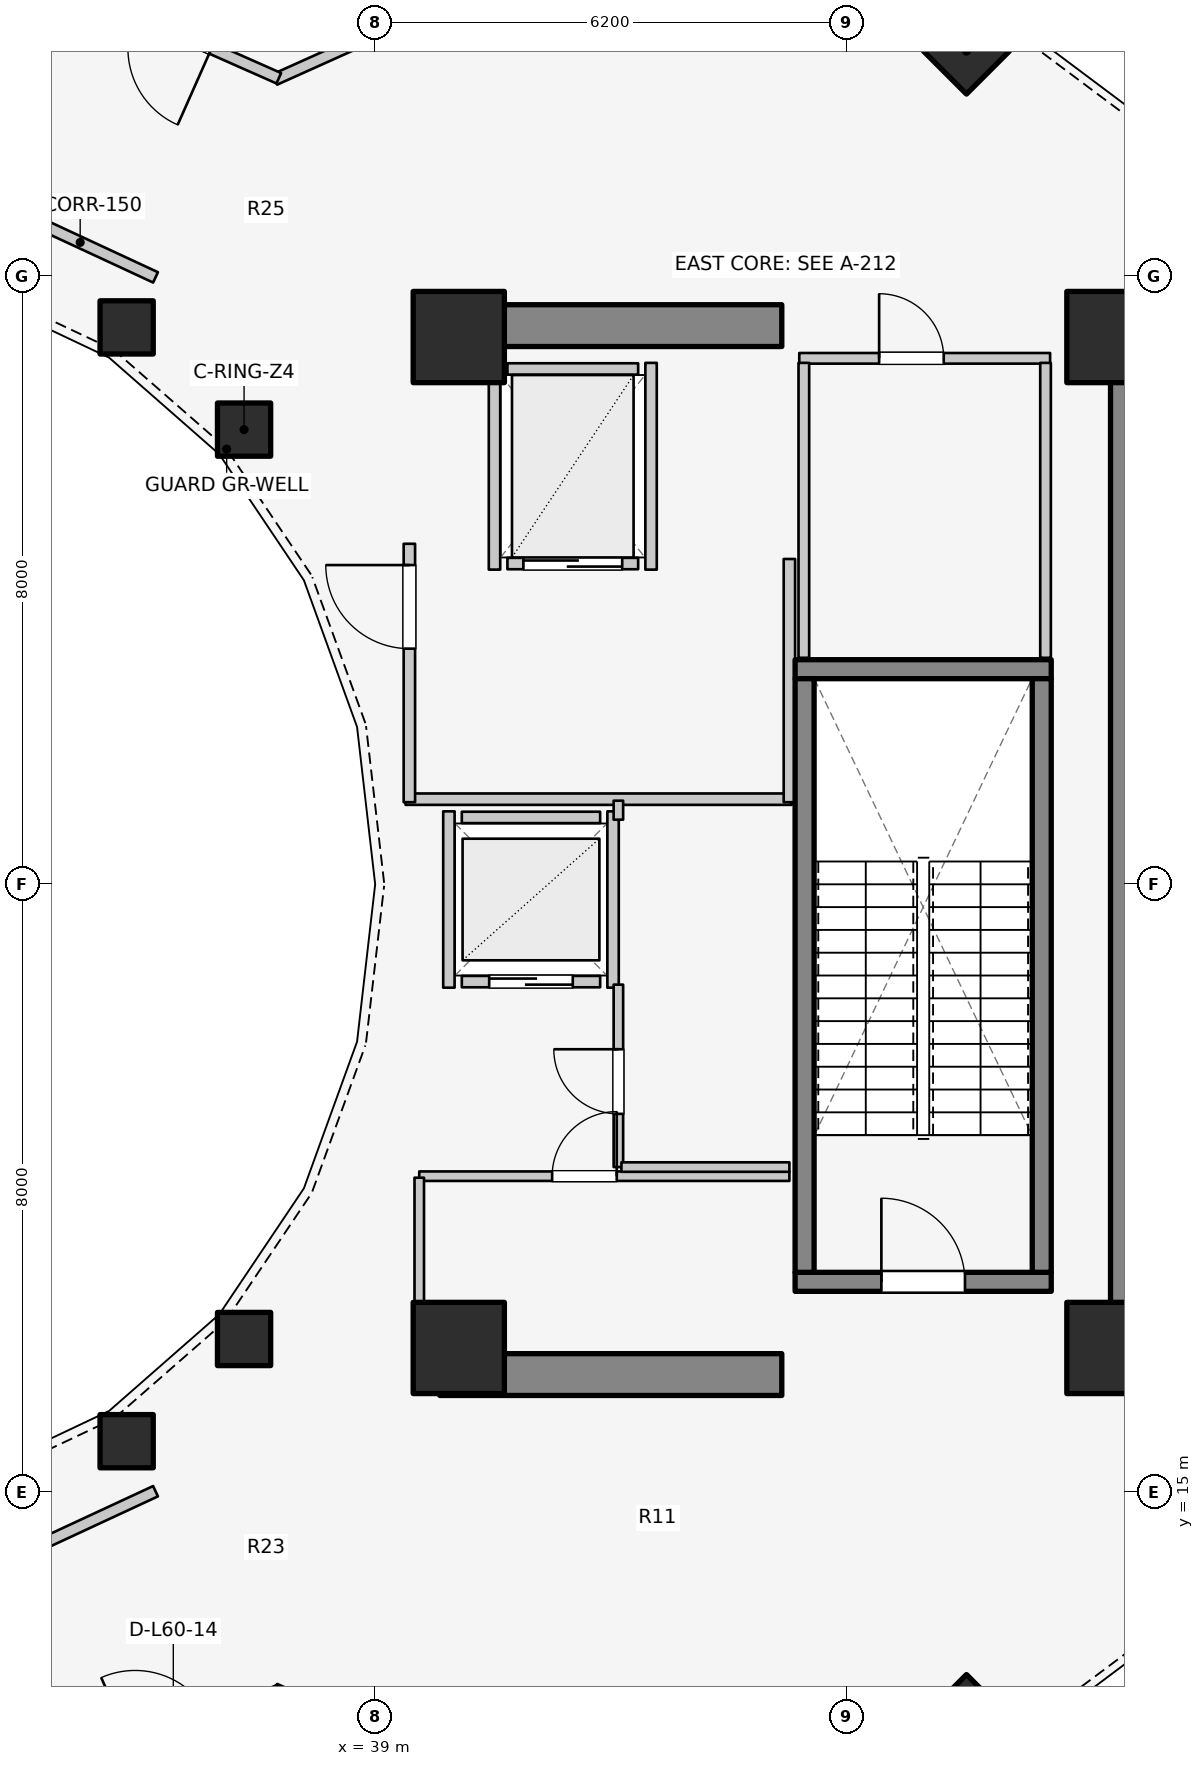
"""IFC4 building model, lengths in metres.
Left out: names, types, materials, properties, quantities, classifications, styles, units other than length and angle.
Written with IfcOpenShell. Run it as: python <this file> out.ifc"""

import sys

from ifc_helpers import new_model, si_unit, direction, frame, frame_2d, origin, origin_2d, place, context, subcontext, project, spatial, rectangle, extrude, element, fill, save


model = new_model("IFC4")
c1 = context("Model", 3, precision=1e-05, world=origin(), true_north=direction((0.0, 1.0)))
c2 = subcontext(c1, "Body", "Model", "MODEL_VIEW")
j1 = project(units=[si_unit("LENGTHUNIT", "METRE"), si_unit("PLANEANGLEUNIT", "RADIAN")], contexts=[c1])
p1 = place(None, origin())
s1 = spatial("IfcSite", under=j1, at=p1, CompositionType="ELEMENT")
p2 = place(p1, origin())
s2 = spatial("IfcBuilding", under=s1, at=p2, CompositionType="ELEMENT")
p3 = place(p2, frame((0.0, 0.0, 197.4)))
s3 = spatial("IfcBuildingStorey", under=s2, at=p3, CompositionType="ELEMENT", Elevation=197.4)
p4 = place(p3, frame((48.95, 17.05, 0.0), z_axis=(0.0, 0.0, 1.0), x_axis=(0.0, 1.0, 0.0)))
e1 = element("IfcWall", 1, at=p4, inside=s3, PredefinedType="SHEAR", context=c2, shape_type="SweptSolid", body=[
    extrude(rectangle(XDim=12.8, YDim=0.55, at=frame_2d((6.4, 0.0))), origin(), (0.0, 0.0, 1.0), 4.2),
])
for number, where, z_axis, x_axis in (
    (2, (39.85, 16.55, 0.0), (0.0, 0.0, 1.0), (1.0, 0.0, 0.0)),
    (3, (39.85, 30.35, 0.0), (0.0, 0.0, 1.0), (1.0, 0.0, 0.0)),
):
    element("IfcWall", number, at=place(p3, frame(where, z_axis=z_axis, x_axis=x_axis)), inside=s3, PredefinedType="SHEAR", context=c2, shape_type="SweptSolid", body=[
        extrude(rectangle(XDim=4.5, YDim=0.55, at=frame_2d((2.25, 0.0))), origin(), (0.0, 0.0, 1.0), 4.2),
    ])
p5 = place(p3, frame((44.525, 17.77, 0.0), z_axis=(0.0, 0.0, 1.0), x_axis=(1.0, 0.0, 0.0)))
e4 = element("IfcWall", 4, at=p5, inside=s3, PredefinedType="SOLIDWALL", context=c2, shape_type="SweptSolid", body=[
    extrude(rectangle(XDim=3.37, YDim=0.25, at=frame_2d((1.685, 0.0))), origin(), (0.0, 0.0, 1.0), 4.2),
])
p6 = place(p5, frame((1.135, 0.0, 0.0)))
e5 = element("IfcOpeningElement", 5, at=p6, cuts=e4, PredefinedType="OPENING", context=c2, shape_type="SweptSolid", body=[
    extrude(rectangle(XDim=1.1, YDim=2.1, at=frame_2d((0.55, 1.05))), frame((0.0, 0.135, 0.0), z_axis=(0.0, -1.0, 0.0), x_axis=(1.0, 0.0, 0.0)), (0.0, 0.0, 1.0), 0.27),
])
p7 = place(p3, frame((44.525, 25.83, 0.0), z_axis=(0.0, 0.0, 1.0), x_axis=(1.0, 0.0, 0.0)))
e6 = element("IfcWall", 6, at=p7, inside=s3, PredefinedType="SOLIDWALL", context=c2, shape_type="SweptSolid", body=[
    extrude(rectangle(XDim=3.37, YDim=0.25, at=frame_2d((1.685, 0.0))), origin(), (0.0, 0.0, 1.0), 4.2),
])
for number, where, z_axis, x_axis in (
    (7, (44.65, 17.895, 0.0), (0.0, 0.0, 1.0), (0.0, 1.0, 0.0)),
    (8, (47.77, 17.895, 0.0), (0.0, 0.0, 1.0), (0.0, 1.0, 0.0)),
):
    element("IfcWall", number, at=place(p3, frame(where, z_axis=z_axis, x_axis=x_axis)), inside=s3, PredefinedType="SOLIDWALL", context=c2, shape_type="SweptSolid", body=[
        extrude(rectangle(XDim=7.81, YDim=0.25, at=frame_2d((3.905, 0.0))), origin(), (0.0, 0.0, 1.0), 4.2),
    ])
for number, where, z_axis, x_axis in (
    (9, (40.1, 16.9, 0.0), (0.0, 0.0, 1.0), (1.0, 0.0, 0.0)),
    (10, (48.7, 16.9, 0.0), (0.0, 0.0, 1.0), (1.0, 0.0, 0.0)),
    (11, (48.7, 30.2, 0.0), (0.0, 0.0, 1.0), (1.0, 0.0, 0.0)),
    (12, (40.1, 30.2, 0.0), (0.0, 0.0, 1.0), (1.0, 0.0, 0.0)),
):
    element("IfcColumn", number, at=place(p3, frame(where, z_axis=z_axis, x_axis=x_axis)), inside=s3, PredefinedType="COLUMN", context=c2, shape_type="SweptSolid", body=[
        extrude(rectangle(XDim=1.2, YDim=1.2, at=origin_2d()), origin(), (0.0, 0.0, 1.0), 4.2),
    ])
p8 = place(p3, frame((37.275, 28.982, 0.0), z_axis=(0.0, 0.0, 1.0), x_axis=(1.0, 0.0, 0.0)))
e13 = element("IfcColumn", 13, at=p8, inside=s3, PredefinedType="COLUMN", context=c2, shape_type="SweptSolid", body=[
    extrude(rectangle(XDim=0.7, YDim=0.7, at=origin_2d()), origin(), (0.0, 0.0, 1.0), 4.2),
])
p9 = place(p3, frame((46.78, 33.962, 0.0), z_axis=(0.0, 0.0, 1.0), x_axis=(0.707106781187, 0.707106781187, 0.0)))
e14 = element("IfcColumn", 14, at=p9, inside=s3, PredefinedType="COLUMN", context=c2, shape_type="SweptSolid", body=[
    extrude(rectangle(XDim=0.8, YDim=0.8, at=origin_2d()), origin(), (0.0, 0.0, 1.0), 4.2),
])
for number, where, z_axis, x_axis in (
    (15, (35.73, 30.327, 0.0), (0.0, 0.0, 1.0), (1.0, 0.0, 0.0)),
    (16, (35.73, 15.673, 0.0), (0.0, 0.0, 1.0), (1.0, 0.0, 0.0)),
    (17, (37.275, 17.018, 0.0), (0.0, 0.0, 1.0), (1.0, 0.0, 0.0)),
):
    element("IfcColumn", number, at=place(p3, frame(where, z_axis=z_axis, x_axis=x_axis)), inside=s3, PredefinedType="COLUMN", context=c2, shape_type="SweptSolid", body=[
        extrude(rectangle(XDim=0.7, YDim=0.7, at=origin_2d()), origin(), (0.0, 0.0, 1.0), 4.2),
    ])
p10 = place(p3, frame((46.78, 12.038, 0.0), z_axis=(0.0, 0.0, 1.0), x_axis=(0.707106781187, -0.707106781187, 0.0)))
e18 = element("IfcColumn", 18, at=p10, inside=s3, PredefinedType="COLUMN", context=c2, shape_type="SweptSolid", body=[
    extrude(rectangle(XDim=0.8, YDim=0.8, at=origin_2d()), origin(), (0.0, 0.0, 1.0), 4.2),
])
p11 = place(p3, frame((40.14, 21.72, 0.0), z_axis=(0.0, 0.0, 1.0), x_axis=(1.0, 0.0, 0.0)))
e19 = element("IfcWall", 19, at=p11, inside=s3, PredefinedType="SOLIDWALL", context=c2, shape_type="SweptSolid", body=[
    extrude(rectangle(XDim=1.82, YDim=0.15, at=frame_2d((0.91, 0.0))), origin(), (0.0, 0.0, 1.0), 3.22),
])
p12 = place(p11, frame((0.36, 0.0, 0.0)))
e20 = element("IfcOpeningElement", 20, at=p12, cuts=e19, PredefinedType="OPENING", context=c2, shape_type="SweptSolid", body=[
    extrude(rectangle(XDim=1.1, YDim=2.1, at=frame_2d((0.55, 1.05))), frame((0.0, 0.085, 0.0), z_axis=(0.0, -1.0, 0.0), x_axis=(1.0, 0.0, 0.0)), (0.0, 0.0, 1.0), 0.17),
])
p13 = place(p3, frame((40.14, 23.88, 0.0), z_axis=(0.0, 0.0, 1.0), x_axis=(1.0, 0.0, 0.0)))
e21 = element("IfcWall", 21, at=p13, inside=s3, PredefinedType="SOLIDWALL", context=c2, shape_type="SweptSolid", body=[
    extrude(rectangle(XDim=1.82, YDim=0.15, at=frame_2d((0.91, 0.0))), origin(), (0.0, 0.0, 1.0), 3.22),
])
p14 = place(p3, frame((39.97, 21.64, 0.0), z_axis=(0.0, 0.0, 1.0), x_axis=(0.0, 1.0, 0.0)))
e22 = element("IfcWall", 22, at=p14, inside=s3, PredefinedType="SOLIDWALL", context=c2, shape_type="SweptSolid", body=[
    extrude(rectangle(XDim=2.32, YDim=0.15, at=frame_2d((1.16, 0.0))), origin(), (0.0, 0.0, 1.0), 3.22),
])
p15 = place(p3, frame((42.13, 21.64, 0.0), z_axis=(0.0, 0.0, 1.0), x_axis=(0.0, 1.0, 0.0)))
e23 = element("IfcWall", 23, at=p15, inside=s3, PredefinedType="SOLIDWALL", context=c2, shape_type="SweptSolid", body=[
    extrude(rectangle(XDim=2.32, YDim=0.15, at=frame_2d((1.16, 0.0))), origin(), (0.0, 0.0, 1.0), 3.675),
])
p16 = place(p3, frame((40.74, 27.22, 0.0), z_axis=(0.0, 0.0, 1.0), x_axis=(1.0, 0.0, 0.0)))
e24 = element("IfcWall", 24, at=p16, inside=s3, PredefinedType="SOLIDWALL", context=c2, shape_type="SweptSolid", body=[
    extrude(rectangle(XDim=1.72, YDim=0.15, at=frame_2d((0.86, 0.0))), origin(), (0.0, 0.0, 1.0), 3.675),
])
p17 = place(p16, frame((0.21, 0.0, 0.0)))
e25 = element("IfcOpeningElement", 25, at=p17, cuts=e24, PredefinedType="OPENING", context=c2, shape_type="SweptSolid", body=[
    extrude(rectangle(XDim=1.3, YDim=2.1, at=frame_2d((0.65, 1.05))), frame((0.0, 0.085, 0.0), z_axis=(0.0, -1.0, 0.0), x_axis=(1.0, 0.0, 0.0)), (0.0, 0.0, 1.0), 0.17),
])
p18 = place(p3, frame((40.74, 29.78, 0.0), z_axis=(0.0, 0.0, 1.0), x_axis=(1.0, 0.0, 0.0)))
e26 = element("IfcWall", 26, at=p18, inside=s3, PredefinedType="SOLIDWALL", context=c2, shape_type="SweptSolid", body=[
    extrude(rectangle(XDim=1.72, YDim=0.15, at=frame_2d((0.86, 0.0))), origin(), (0.0, 0.0, 1.0), 3.675),
])
for number, where, z_axis, x_axis in (
    (27, (40.57, 27.14, 0.0), (0.0, 0.0, 1.0), (0.0, 1.0, 0.0)),
    (28, (42.63, 27.14, 0.0), (0.0, 0.0, 1.0), (0.0, 1.0, 0.0)),
):
    element("IfcWall", number, at=place(p3, frame(where, z_axis=z_axis, x_axis=x_axis)), inside=s3, PredefinedType="SOLIDWALL", context=c2, shape_type="SweptSolid", body=[
        extrude(rectangle(XDim=2.72, YDim=0.15, at=frame_2d((1.36, 0.0))), origin(), (0.0, 0.0, 1.0), 3.675),
    ])
p19 = place(p3, frame((39.4, 24.12, 0.0), z_axis=(0.0, 0.0, 1.0), x_axis=(1.0, 0.0, 0.0)))
e29 = element("IfcWall", 29, at=p19, inside=s3, PredefinedType="PARTITIONING", context=c2, shape_type="SweptSolid", body=[
    extrude(rectangle(XDim=5.08, YDim=0.15, at=frame_2d((2.54, 0.0))), origin(), (0.0, 0.0, 1.0), 3.22),
])
p20 = place(p3, frame((44.45, 24.08, 0.0), z_axis=(0.0, 0.0, 1.0), x_axis=(0.0, 1.0, 0.0)))
e30 = element("IfcWall", 30, at=p20, inside=s3, PredefinedType="PARTITIONING", context=c2, shape_type="SweptSolid", body=[
    extrude(rectangle(XDim=3.2, YDim=0.15, at=frame_2d((1.6, 0.0))), origin(), (0.0, 0.0, 1.0), 3.675),
])
p21 = place(p3, frame((39.45, 24.08, 0.0), z_axis=(0.0, 0.0, 1.0), x_axis=(0.0, 1.0, 0.0)))
e31 = element("IfcWall", 31, at=p21, inside=s3, PredefinedType="PARTITIONING", context=c2, shape_type="SweptSolid", body=[
    extrude(rectangle(XDim=3.4, YDim=0.15, at=frame_2d((1.7, 0.0))), origin(), (0.0, 0.0, 1.0), 3.675),
])
p22 = place(p21, frame((2.02, 0.0, 0.0)))
e32 = element("IfcOpeningElement", 32, at=p22, cuts=e31, PredefinedType="OPENING", context=c2, shape_type="SweptSolid", body=[
    extrude(rectangle(XDim=1.1, YDim=2.1, at=frame_2d((0.55, 1.05))), frame((0.0, 0.085, 0.0), z_axis=(0.0, -1.0, 0.0), x_axis=(1.0, 0.0, 0.0)), (0.0, 0.0, 1.0), 0.17),
])
p23 = place(p3, frame((39.58, 19.16, 0.0), z_axis=(0.0, 0.0, 1.0), x_axis=(1.0, 0.0, 0.0)))
e33 = element("IfcWall", 33, at=p23, inside=s3, PredefinedType="PARTITIONING", context=c2, shape_type="SweptSolid", body=[
    extrude(rectangle(XDim=4.87, YDim=0.125, at=frame_2d((2.435, 0.0))), origin(), (0.0, 0.0, 1.0), 3.22),
])
p24 = place(p23, frame((1.748, 0.0, 0.0)))
e34 = element("IfcOpeningElement", 34, at=p24, cuts=e33, PredefinedType="OPENING", context=c2, shape_type="SweptSolid", body=[
    extrude(rectangle(XDim=0.85, YDim=2.05, at=frame_2d((0.425, 1.025))), frame((0.0, 0.073, 0.0), z_axis=(0.0, -1.0, 0.0), x_axis=(1.0, 0.0, 0.0)), (0.0, 0.0, 1.0), 0.145),
])
p25 = place(p3, frame((39.58, 17.1, 0.0), z_axis=(0.0, 0.0, 1.0), x_axis=(0.0, 1.0, 0.0)))
e35 = element("IfcWall", 35, at=p25, inside=s3, PredefinedType="PARTITIONING", context=c2, shape_type="SweptSolid", body=[
    extrude(rectangle(XDim=2.04, YDim=0.125, at=frame_2d((1.02, 0.0))), origin(), (0.0, 0.0, 1.0), 3.052),
])
p26 = place(p3, frame((42.2, 19.28, 0.0), z_axis=(0.0, 0.0, 1.0), x_axis=(0.0, 1.0, 0.0)))
e36 = element("IfcWall", 36, at=p26, inside=s3, PredefinedType="PARTITIONING", context=c2, shape_type="SweptSolid", body=[
    extrude(rectangle(XDim=2.4, YDim=0.125, at=frame_2d((1.2, 0.0))), origin(), (0.0, 0.0, 1.0), 3.675),
])
p27 = place(p26, frame((0.7, 0.0, 0.0)))
e37 = element("IfcOpeningElement", 37, at=p27, cuts=e36, PredefinedType="OPENING", context=c2, shape_type="SweptSolid", body=[
    extrude(rectangle(XDim=0.85, YDim=2.05, at=frame_2d((0.425, 1.025))), frame((0.0, 0.073, 0.0), z_axis=(0.0, -1.0, 0.0), x_axis=(1.0, 0.0, 0.0)), (0.0, 0.0, 1.0), 0.145),
])
p28 = place(p3, frame((42.2, 23.85, 0.0), z_axis=(0.0, 0.0, 1.0), x_axis=(0.0, 1.0, 0.0)))
e38 = element("IfcWall", 38, at=p28, inside=s3, PredefinedType="PARTITIONING", context=c2, shape_type="SweptSolid", body=[
    extrude(rectangle(XDim=0.25, YDim=0.125, at=frame_2d((0.125, 0.0))), origin(), (0.0, 0.0, 1.0), 3.675),
])
p29 = place(p3, frame((42.24, 19.28, 0.0), z_axis=(0.0, 0.0, 1.0), x_axis=(1.0, 0.0, 0.0)))
e39 = element("IfcWall", 39, at=p29, inside=s3, PredefinedType="PARTITIONING", context=c2, shape_type="SweptSolid", body=[
    extrude(rectangle(XDim=2.21, YDim=0.125, at=frame_2d((1.105, 0.0))), origin(), (0.0, 0.0, 1.0), 3.22),
])
for number, where, z_axis, x_axis in (
    (40, (36.11, 30.985, 0.0), (0.0, 0.0, 1.0), (-0.907, 0.421, 0.0)),
    (41, (34.127, 14.094, 0.0), (0.0, 0.0, 1.0), (0.907, 0.421, 0.0)),
):
    element("IfcWall", number, at=place(p3, frame(where, z_axis=z_axis, x_axis=x_axis)), inside=s3, PredefinedType="PARTITIONING", context=c2, shape_type="SweptSolid", body=[
        extrude(rectangle(XDim=2.186, YDim=0.15, at=frame_2d((1.093, 0.0))), origin(), (0.0, 0.0, 1.0), 2.32),
    ])
p30 = place(p3, frame((37.679, 33.588, 0.0), z_axis=(0.0, 0.0, 1.0), x_axis=(0.912031098102, 0.410121050538, 0.0)))
e42 = element("IfcWall", 42, at=p30, inside=s3, PredefinedType="PARTITIONING", context=c2, shape_type="SweptSolid", body=[
    extrude(rectangle(XDim=6.125, YDim=0.15, at=frame_2d((3.063, 0.0))), origin(), (0.0, 0.0, 1.0), 2.32),
])
p31 = place(p3, frame((37.732, 33.604, 0.0), z_axis=(0.0, 0.0, 1.0), x_axis=(-0.914251978061, 0.405146048496, 0.0)))
e43 = element("IfcWall", 43, at=p31, inside=s3, PredefinedType="PARTITIONING", context=c2, shape_type="SweptSolid", body=[
    extrude(rectangle(XDim=3.036, YDim=0.15, at=frame_2d((1.518, 0.0))), origin(), (0.0, 0.0, 1.0), 2.32),
])
p32 = place(p31, frame((0.968, 0.0, 0.0)))
e44 = element("IfcOpeningElement", 44, at=p32, cuts=e43, PredefinedType="OPENING", context=c2, shape_type="SweptSolid", body=[
    extrude(rectangle(XDim=1.1, YDim=2.1, at=frame_2d((0.55, 1.05))), frame((0.0, 0.085, 0.0), z_axis=(0.0, -1.0, 0.0), x_axis=(1.0, 0.0, 0.0)), (0.0, 0.0, 1.0), 0.17),
])
p33 = place(p3, frame((37.679, 12.412, 0.0), z_axis=(0.0, 0.0, 1.0), x_axis=(0.912031098102, -0.410121050538, 0.0)))
e45 = element("IfcWall", 45, at=p33, inside=s3, PredefinedType="PARTITIONING", context=c2, shape_type="SweptSolid", body=[
    extrude(rectangle(XDim=6.125, YDim=0.15, at=frame_2d((3.063, 0.0))), origin(), (0.0, 0.0, 1.0), 2.32),
])
p34 = place(p3, frame((34.956, 11.165, 0.0), z_axis=(0.0, 0.0, 1.0), x_axis=(0.914251978061, 0.405146048496, 0.0)))
e46 = element("IfcWall", 46, at=p34, inside=s3, PredefinedType="PARTITIONING", context=c2, shape_type="SweptSolid", body=[
    extrude(rectangle(XDim=3.036, YDim=0.15, at=frame_2d((1.518, 0.0))), origin(), (0.0, 0.0, 1.0), 2.32),
])
p35 = place(p34, frame((0.968, 0.0, 0.0)))
e47 = element("IfcOpeningElement", 47, at=p35, cuts=e46, PredefinedType="OPENING", context=c2, shape_type="SweptSolid", body=[
    extrude(rectangle(XDim=1.1, YDim=2.1, at=frame_2d((0.55, 1.05))), frame((0.0, 0.085, 0.0), z_axis=(0.0, -1.0, 0.0), x_axis=(1.0, 0.0, 0.0)), (0.0, 0.0, 1.0), 0.17),
])
p36 = place(p3, frame((44.58, 29.92, 0.0), z_axis=(0.0, 0.0, 1.0), x_axis=(1.0, 0.0, 0.0)))
e48 = element("IfcWall", 48, at=p36, inside=s3, PredefinedType="PLUMBINGWALL", context=c2, shape_type="SweptSolid", body=[
    extrude(rectangle(XDim=3.3, YDim=0.14, at=frame_2d((1.65, 0.0))), origin(), (0.0, 0.0, 1.0), 3.675),
])
p37 = place(p36, frame((1.051, 0.0, 0.0)))
e49 = element("IfcOpeningElement", 49, at=p37, cuts=e48, PredefinedType="OPENING", context=c2, shape_type="SweptSolid", body=[
    extrude(rectangle(XDim=0.85, YDim=2.05, at=frame_2d((0.425, 1.025))), frame((0.0, 0.08, 0.0), z_axis=(0.0, -1.0, 0.0), x_axis=(1.0, 0.0, 0.0)), (0.0, 0.0, 1.0), 0.16),
])
for number, where, z_axis, x_axis in (
    (50, (44.64, 25.98, 0.0), (0.0, 0.0, 1.0), (0.0, 1.0, 0.0)),
    (51, (47.82, 25.98, 0.0), (0.0, 0.0, 1.0), (0.0, 1.0, 0.0)),
):
    element("IfcWall", number, at=place(p3, frame(where, z_axis=z_axis, x_axis=x_axis)), inside=s3, PredefinedType="PLUMBINGWALL", context=c2, shape_type="SweptSolid", body=[
        extrude(rectangle(XDim=3.88, YDim=0.14, at=frame_2d((1.94, 0.0))), origin(), (0.0, 0.0, 1.0), 3.675),
    ])
p38 = place(p6, origin())
e52 = element("IfcDoor", 52, at=p38, inside=s3, OperationType="SINGLE_SWING_LEFT", PredefinedType="DOOR", context=c2, shape_type="SweptSolid", body=[
    extrude(rectangle(XDim=1.1, YDim=2.1, at=frame_2d((0.55, 1.05))), frame((0.0, 0.025, 0.0), z_axis=(0.0, -1.0, 0.0), x_axis=(1.0, 0.0, 0.0)), (0.0, 0.0, 1.0), 0.05),
])
fill(e5, e52)
p39 = place(p12, origin())
e53 = element("IfcDoor", 53, at=p39, inside=s3, OperationType="DOUBLE_DOOR_SLIDING", PredefinedType="DOOR", context=c2, shape_type="SweptSolid", body=[
    extrude(rectangle(XDim=1.1, YDim=2.1, at=frame_2d((0.55, 1.05))), frame((0.0, 0.025, 0.0), z_axis=(0.0, -1.0, 0.0), x_axis=(1.0, 0.0, 0.0)), (0.0, 0.0, 1.0), 0.05),
])
fill(e20, e53)
p40 = place(p17, origin())
e54 = element("IfcDoor", 54, at=p40, inside=s3, OperationType="DOUBLE_DOOR_SLIDING", PredefinedType="DOOR", context=c2, shape_type="SweptSolid", body=[
    extrude(rectangle(XDim=1.3, YDim=2.1, at=frame_2d((0.65, 1.05))), frame((0.0, 0.025, 0.0), z_axis=(0.0, -1.0, 0.0), x_axis=(1.0, 0.0, 0.0)), (0.0, 0.0, 1.0), 0.05),
])
fill(e25, e54)
p41 = place(p22, origin())
e55 = element("IfcDoor", 55, at=p41, inside=s3, OperationType="SINGLE_SWING_RIGHT", PredefinedType="DOOR", context=c2, shape_type="SweptSolid", body=[
    extrude(rectangle(XDim=1.1, YDim=2.1, at=frame_2d((0.55, 1.05))), frame((0.0, 0.025, 0.0), z_axis=(0.0, -1.0, 0.0), x_axis=(1.0, 0.0, 0.0)), (0.0, 0.0, 1.0), 0.05),
])
fill(e32, e55)
p42 = place(p24, origin())
e56 = element("IfcDoor", 56, at=p42, inside=s3, OperationType="SINGLE_SWING_RIGHT", PredefinedType="DOOR", context=c2, shape_type="SweptSolid", body=[
    extrude(rectangle(XDim=0.85, YDim=2.05, at=frame_2d((0.425, 1.025))), frame((0.0, 0.025, 0.0), z_axis=(0.0, -1.0, 0.0), x_axis=(1.0, 0.0, 0.0)), (0.0, 0.0, 1.0), 0.05),
])
fill(e34, e56)
p43 = place(p27, origin())
e57 = element("IfcDoor", 57, at=p43, inside=s3, OperationType="SINGLE_SWING_RIGHT", PredefinedType="DOOR", context=c2, shape_type="SweptSolid", body=[
    extrude(rectangle(XDim=0.85, YDim=2.05, at=frame_2d((0.425, 1.025))), frame((0.0, 0.025, 0.0), z_axis=(0.0, -1.0, 0.0), x_axis=(1.0, 0.0, 0.0)), (0.0, 0.0, 1.0), 0.05),
])
fill(e37, e57)
p44 = place(p37, origin())
e58 = element("IfcDoor", 58, at=p44, inside=s3, OperationType="SINGLE_SWING_LEFT", PredefinedType="DOOR", context=c2, shape_type="SweptSolid", body=[
    extrude(rectangle(XDim=0.85, YDim=2.05, at=frame_2d((0.425, 1.025))), frame((0.0, 0.025, 0.0), z_axis=(0.0, -1.0, 0.0), x_axis=(1.0, 0.0, 0.0)), (0.0, 0.0, 1.0), 0.05),
])
fill(e49, e58)
save(model, sys.argv[1])
